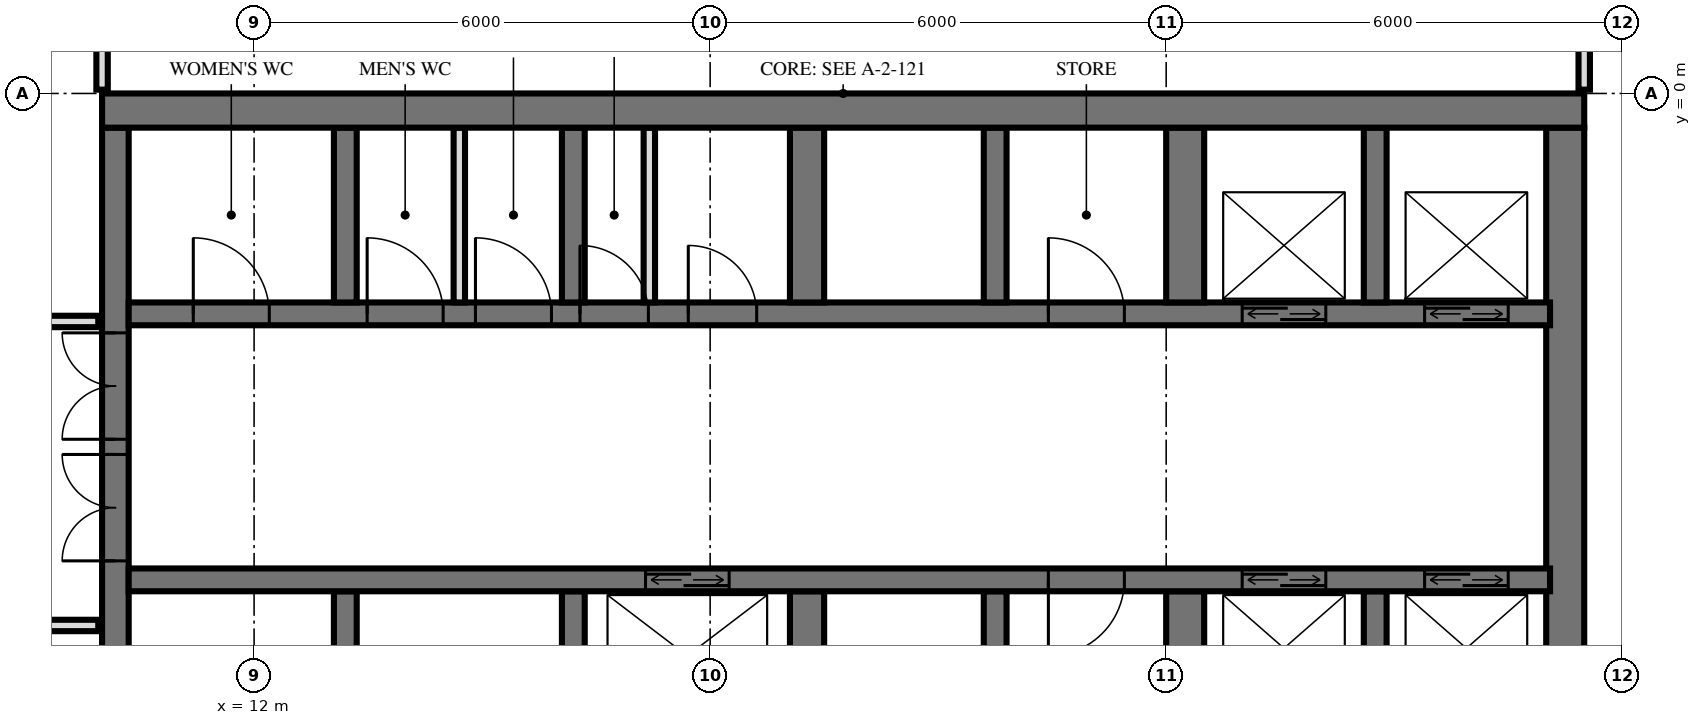
"""IFC4 building model, lengths in metres.
Left out: names, types, materials, properties, quantities, classifications, styles, units other than length and angle.
Written with IfcOpenShell. Run it as: python <this file> out.ifc"""

import sys

from ifc_helpers import new_model, si_unit, direction, frame, frame_2d, origin, place, context, subcontext, project, spatial, rectangle, extrude, element, fill, save


model = new_model("IFC4")
c1 = context("Model", 3, precision=1e-05, world=origin(), true_north=direction((0.0, 1.0)))
c2 = subcontext(c1, "Body", "Model", "MODEL_VIEW")
j1 = project(units=[si_unit("LENGTHUNIT", "METRE"), si_unit("PLANEANGLEUNIT", "RADIAN")], contexts=[c1])
p1 = place(None, origin())
s1 = spatial("IfcSite", under=j1, at=p1, CompositionType="ELEMENT")
p2 = place(p1, origin())
s2 = spatial("IfcBuilding", under=s1, at=p2, CompositionType="ELEMENT")
p3 = place(p2, frame((0.0, 0.0, 31.2)))
s3 = spatial("IfcBuildingStorey", under=s2, at=p3, CompositionType="ELEMENT", Elevation=31.2)
p4 = place(p3, frame((10.0, -0.225, 0.0), z_axis=(0.0, 0.0, 1.0), x_axis=(1.0, 0.0, 0.0)))
e1 = element("IfcWall", 1, at=p4, inside=s3, PredefinedType="SHEAR", context=c2, shape_type="SweptSolid", body=[
    extrude(rectangle(XDim=19.5, YDim=0.45, at=frame_2d((9.75, 0.0))), origin(), (0.0, 0.0, 1.0), 3.6),
])
p5 = place(p3, frame((10.175, -14.55, 0.0), z_axis=(0.0, 0.0, 1.0), x_axis=(0.0, 1.0, 0.0)))
e2 = element("IfcWall", 2, at=p5, inside=s3, PredefinedType="SHEAR", context=c2, shape_type="SweptSolid", body=[
    extrude(rectangle(XDim=14.1, YDim=0.35, at=frame_2d((7.05, 0.0))), origin(), (0.0, 0.0, 1.0), 3.6),
])
p6 = place(p5, frame((8.4, 0.0, 0.0)))
e3 = element("IfcOpeningElement", 3, at=p6, cuts=e2, PredefinedType="OPENING", context=c2, shape_type="SweptSolid", body=[
    extrude(rectangle(XDim=1.4, YDim=2.4, at=frame_2d((0.7, 1.2))), frame((0.0, 0.185, 0.0), z_axis=(0.0, -1.0, 0.0), x_axis=(1.0, 0.0, 0.0)), (0.0, 0.0, 1.0), 0.37),
])
p7 = place(p5, frame((10.0, 0.0, 0.0)))
e4 = element("IfcOpeningElement", 4, at=p7, cuts=e2, PredefinedType="OPENING", context=c2, shape_type="SweptSolid", body=[
    extrude(rectangle(XDim=1.4, YDim=2.4, at=frame_2d((0.7, 1.2))), frame((0.0, 0.185, 0.0), z_axis=(0.0, -1.0, 0.0), x_axis=(1.0, 0.0, 0.0)), (0.0, 0.0, 1.0), 0.37),
])
p8 = place(p5, frame((4.0, 0.0, 0.0)))
e5 = element("IfcOpeningElement", 5, at=p8, cuts=e2, PredefinedType="OPENING", context=c2, shape_type="SweptSolid", body=[
    extrude(rectangle(XDim=1.2, YDim=2.1, at=frame_2d((0.6, 1.05))), frame((0.0, 0.185, 0.0), z_axis=(0.0, -1.0, 0.0), x_axis=(1.0, 0.0, 0.0)), (0.0, 0.0, 1.0), 0.37),
])
p9 = place(p3, frame((29.25, -14.55, 0.0), z_axis=(0.0, 0.0, 1.0), x_axis=(0.0, 1.0, 0.0)))
e6 = element("IfcWall", 6, at=p9, inside=s3, PredefinedType="SHEAR", context=c2, shape_type="SweptSolid", body=[
    extrude(rectangle(XDim=14.1, YDim=0.5, at=frame_2d((7.05, 0.0))), origin(), (0.0, 0.0, 1.0), 3.6),
])
p10 = place(p3, frame((10.35, -2.9, 0.0), z_axis=(0.0, 0.0, 1.0), x_axis=(1.0, 0.0, 0.0)))
e7 = element("IfcWall", 7, at=p10, inside=s3, PredefinedType="SHEAR", context=c2, shape_type="SweptSolid", body=[
    extrude(rectangle(XDim=18.7, YDim=0.3, at=frame_2d((9.35, 0.0))), origin(), (0.0, 0.0, 1.0), 3.6),
])
p11 = place(p10, frame((14.65, 0.0, 0.0)))
e8 = element("IfcOpeningElement", 8, at=p11, cuts=e7, PredefinedType="OPENING", context=c2, shape_type="SweptSolid", body=[
    extrude(rectangle(XDim=1.1, YDim=2.1, at=frame_2d((0.55, 1.05))), frame((0.0, 0.16, 0.0), z_axis=(0.0, -1.0, 0.0), x_axis=(1.0, 0.0, 0.0)), (0.0, 0.0, 1.0), 0.32),
])
p12 = place(p10, frame((17.05, 0.0, 0.0)))
e9 = element("IfcOpeningElement", 9, at=p12, cuts=e7, PredefinedType="OPENING", context=c2, shape_type="SweptSolid", body=[
    extrude(rectangle(XDim=1.1, YDim=2.1, at=frame_2d((0.55, 1.05))), frame((0.0, 0.16, 0.0), z_axis=(0.0, -1.0, 0.0), x_axis=(1.0, 0.0, 0.0)), (0.0, 0.0, 1.0), 0.32),
])
p13 = place(p10, frame((5.938, 0.0, 0.0)))
e10 = element("IfcOpeningElement", 10, at=p13, cuts=e7, PredefinedType="OPENING", context=c2, shape_type="SweptSolid", body=[
    extrude(rectangle(XDim=0.9, YDim=2.1, at=frame_2d((0.45, 1.05))), frame((0.0, 0.16, 0.0), z_axis=(0.0, -1.0, 0.0), x_axis=(1.0, 0.0, 0.0)), (0.0, 0.0, 1.0), 0.32),
])
p14 = place(p10, frame((7.363, 0.0, 0.0)))
e11 = element("IfcOpeningElement", 11, at=p14, cuts=e7, PredefinedType="OPENING", context=c2, shape_type="SweptSolid", body=[
    extrude(rectangle(XDim=0.9, YDim=2.1, at=frame_2d((0.45, 1.05))), frame((0.0, 0.16, 0.0), z_axis=(0.0, -1.0, 0.0), x_axis=(1.0, 0.0, 0.0)), (0.0, 0.0, 1.0), 0.32),
])
p15 = place(p10, frame((0.85, 0.0, 0.0)))
e12 = element("IfcOpeningElement", 12, at=p15, cuts=e7, PredefinedType="OPENING", context=c2, shape_type="SweptSolid", body=[
    extrude(rectangle(XDim=1.0, YDim=2.1, at=frame_2d((0.5, 1.05))), frame((0.0, 0.16, 0.0), z_axis=(0.0, -1.0, 0.0), x_axis=(1.0, 0.0, 0.0)), (0.0, 0.0, 1.0), 0.32),
])
p16 = place(p10, frame((3.137, 0.0, 0.0)))
e13 = element("IfcOpeningElement", 13, at=p16, cuts=e7, PredefinedType="OPENING", context=c2, shape_type="SweptSolid", body=[
    extrude(rectangle(XDim=1.0, YDim=2.1, at=frame_2d((0.5, 1.05))), frame((0.0, 0.16, 0.0), z_axis=(0.0, -1.0, 0.0), x_axis=(1.0, 0.0, 0.0)), (0.0, 0.0, 1.0), 0.32),
])
p17 = place(p10, frame((4.562, 0.0, 0.0)))
e14 = element("IfcOpeningElement", 14, at=p17, cuts=e7, PredefinedType="OPENING", context=c2, shape_type="SweptSolid", body=[
    extrude(rectangle(XDim=1.0, YDim=2.1, at=frame_2d((0.5, 1.05))), frame((0.0, 0.16, 0.0), z_axis=(0.0, -1.0, 0.0), x_axis=(1.0, 0.0, 0.0)), (0.0, 0.0, 1.0), 0.32),
])
p18 = place(p10, frame((12.1, 0.0, 0.0)))
e15 = element("IfcOpeningElement", 15, at=p18, cuts=e7, PredefinedType="OPENING", context=c2, shape_type="SweptSolid", body=[
    extrude(rectangle(XDim=1.0, YDim=2.1, at=frame_2d((0.5, 1.05))), frame((0.0, 0.16, 0.0), z_axis=(0.0, -1.0, 0.0), x_axis=(1.0, 0.0, 0.0)), (0.0, 0.0, 1.0), 0.32),
])
p19 = place(p3, frame((10.35, -6.4, 0.0), z_axis=(0.0, 0.0, 1.0), x_axis=(1.0, 0.0, 0.0)))
e16 = element("IfcWall", 16, at=p19, inside=s3, PredefinedType="SHEAR", context=c2, shape_type="SweptSolid", body=[
    extrude(rectangle(XDim=18.7, YDim=0.3, at=frame_2d((9.35, 0.0))), origin(), (0.0, 0.0, 1.0), 3.6),
])
p20 = place(p19, frame((14.65, 0.0, 0.0)))
e17 = element("IfcOpeningElement", 17, at=p20, cuts=e16, PredefinedType="OPENING", context=c2, shape_type="SweptSolid", body=[
    extrude(rectangle(XDim=1.1, YDim=2.1, at=frame_2d((0.55, 1.05))), frame((0.0, 0.16, 0.0), z_axis=(0.0, -1.0, 0.0), x_axis=(1.0, 0.0, 0.0)), (0.0, 0.0, 1.0), 0.32),
])
p21 = place(p19, frame((17.05, 0.0, 0.0)))
e18 = element("IfcOpeningElement", 18, at=p21, cuts=e16, PredefinedType="OPENING", context=c2, shape_type="SweptSolid", body=[
    extrude(rectangle(XDim=1.1, YDim=2.1, at=frame_2d((0.55, 1.05))), frame((0.0, 0.16, 0.0), z_axis=(0.0, -1.0, 0.0), x_axis=(1.0, 0.0, 0.0)), (0.0, 0.0, 1.0), 0.32),
])
p22 = place(p19, frame((6.8, 0.0, 0.0)))
e19 = element("IfcOpeningElement", 19, at=p22, cuts=e16, PredefinedType="OPENING", context=c2, shape_type="SweptSolid", body=[
    extrude(rectangle(XDim=1.1, YDim=2.1, at=frame_2d((0.55, 1.05))), frame((0.0, 0.16, 0.0), z_axis=(0.0, -1.0, 0.0), x_axis=(1.0, 0.0, 0.0)), (0.0, 0.0, 1.0), 0.32),
])
p23 = place(p19, frame((12.1, 0.0, 0.0)))
e20 = element("IfcOpeningElement", 20, at=p23, cuts=e16, PredefinedType="OPENING", context=c2, shape_type="SweptSolid", body=[
    extrude(rectangle(XDim=1.0, YDim=2.1, at=frame_2d((0.5, 1.05))), frame((0.0, 0.16, 0.0), z_axis=(0.0, -1.0, 0.0), x_axis=(1.0, 0.0, 0.0)), (0.0, 0.0, 1.0), 0.32),
])
for number, where, z_axis, x_axis in (
    (21, (13.2, -2.75, 0.0), (0.0, 0.0, 1.0), (0.0, 1.0, 0.0)),
    (22, (13.2, -8.85, 0.0), (0.0, 0.0, 1.0), (0.0, 1.0, 0.0)),
    (23, (16.2, -2.75, 0.0), (0.0, 0.0, 1.0), (0.0, 1.0, 0.0)),
    (24, (16.2, -8.85, 0.0), (0.0, 0.0, 1.0), (0.0, 1.0, 0.0)),
):
    element("IfcWall", number, at=place(p3, frame(where, z_axis=z_axis, x_axis=x_axis)), inside=s3, PredefinedType="SHEAR", context=c2, shape_type="SweptSolid", body=[
        extrude(rectangle(XDim=2.3, YDim=0.3, at=frame_2d((1.15, 0.0))), origin(), (0.0, 0.0, 1.0), 3.6),
    ])
for number, where, z_axis, x_axis in (
    (25, (19.275, -2.75, 0.0), (0.0, 0.0, 1.0), (0.0, 1.0, 0.0)),
    (26, (19.275, -8.85, 0.0), (0.0, 0.0, 1.0), (0.0, 1.0, 0.0)),
):
    element("IfcWall", number, at=place(p3, frame(where, z_axis=z_axis, x_axis=x_axis)), inside=s3, PredefinedType="SHEAR", context=c2, shape_type="SweptSolid", body=[
        extrude(rectangle(XDim=2.3, YDim=0.45, at=frame_2d((1.15, 0.0))), origin(), (0.0, 0.0, 1.0), 3.6),
    ])
for number, where, z_axis, x_axis in (
    (27, (21.75, -2.75, 0.0), (0.0, 0.0, 1.0), (0.0, 1.0, 0.0)),
    (28, (21.75, -8.85, 0.0), (0.0, 0.0, 1.0), (0.0, 1.0, 0.0)),
):
    element("IfcWall", number, at=place(p3, frame(where, z_axis=z_axis, x_axis=x_axis)), inside=s3, PredefinedType="SHEAR", context=c2, shape_type="SweptSolid", body=[
        extrude(rectangle(XDim=2.3, YDim=0.3, at=frame_2d((1.15, 0.0))), origin(), (0.0, 0.0, 1.0), 3.6),
    ])
for number, where, z_axis, x_axis in (
    (29, (24.25, -2.75, 0.0), (0.0, 0.0, 1.0), (0.0, 1.0, 0.0)),
    (30, (24.25, -8.85, 0.0), (0.0, 0.0, 1.0), (0.0, 1.0, 0.0)),
):
    element("IfcWall", number, at=place(p3, frame(where, z_axis=z_axis, x_axis=x_axis)), inside=s3, PredefinedType="SHEAR", context=c2, shape_type="SweptSolid", body=[
        extrude(rectangle(XDim=2.3, YDim=0.5, at=frame_2d((1.15, 0.0))), origin(), (0.0, 0.0, 1.0), 3.6),
    ])
for number, where, z_axis, x_axis in (
    (31, (26.75, -2.75, 0.0), (0.0, 0.0, 1.0), (0.0, 1.0, 0.0)),
    (32, (26.75, -8.85, 0.0), (0.0, 0.0, 1.0), (0.0, 1.0, 0.0)),
):
    element("IfcWall", number, at=place(p3, frame(where, z_axis=z_axis, x_axis=x_axis)), inside=s3, PredefinedType="SHEAR", context=c2, shape_type="SweptSolid", body=[
        extrude(rectangle(XDim=2.3, YDim=0.3, at=frame_2d((1.15, 0.0))), origin(), (0.0, 0.0, 1.0), 3.6),
    ])
for number, where, z_axis, x_axis in (
    (33, (17.2, -2.75, 0.0), (0.0, 0.0, 1.0), (0.0, 1.0, 0.0)),
    (34, (14.7, -2.75, 0.0), (0.0, 0.0, 1.0), (0.0, 1.0, 0.0)),
):
    element("IfcWall", number, at=place(p3, frame(where, z_axis=z_axis, x_axis=x_axis)), inside=s3, PredefinedType="PARTITIONING", context=c2, shape_type="SweptSolid", body=[
        extrude(rectangle(XDim=2.3, YDim=0.15, at=frame_2d((1.15, 0.0))), origin(), (0.0, 0.0, 1.0), 3.3),
    ])
p24 = place(p3, frame((29.5, 0.05, 0.0), z_axis=(0.0, 0.0, 1.0), x_axis=(0.0, 1.0, 0.0)))
e35 = element("IfcWall", 35, at=p24, inside=s3, PredefinedType="PARTITIONING", context=c2, shape_type="SweptSolid", body=[
    extrude(rectangle(XDim=0.827, YDim=0.15, at=frame_2d((0.414, 0.0))), origin(), (0.0, 0.0, 1.0), 3.32),
])
p25 = place(p3, frame((10.0, 0.05, 0.0), z_axis=(0.0, 0.0, 1.0), x_axis=(0.0, 1.0, 0.0)))
e36 = element("IfcWall", 36, at=p25, inside=s3, PredefinedType="PARTITIONING", context=c2, shape_type="SweptSolid", body=[
    extrude(rectangle(XDim=0.97, YDim=0.15, at=frame_2d((0.485, 0.0))), origin(), (0.0, 0.0, 1.0), 3.32),
])
p26 = place(p3, frame((-9.95, -7.0, 0.0), z_axis=(0.0, 0.0, 1.0), x_axis=(1.0, 0.0, 0.0)))
e37 = element("IfcWall", 37, at=p26, inside=s3, PredefinedType="PARTITIONING", context=c2, shape_type="SweptSolid", body=[
    extrude(rectangle(XDim=19.9, YDim=0.15, at=frame_2d((9.95, 0.0))), origin(), (0.0, 0.0, 1.0), 3.32),
])
p27 = place(p26, frame((9.45, 0.0, 0.0)))
e38 = element("IfcOpeningElement", 38, at=p27, cuts=e37, PredefinedType="OPENING", context=c2, shape_type="SweptSolid", body=[
    extrude(rectangle(XDim=1.0, YDim=2.1, at=frame_2d((0.5, 1.05))), frame((0.0, 0.085, 0.0), z_axis=(0.0, -1.0, 0.0), x_axis=(1.0, 0.0, 0.0)), (0.0, 0.0, 1.0), 0.17),
])
p28 = place(p26, frame((3.45, 0.0, 0.0)))
e39 = element("IfcOpeningElement", 39, at=p28, cuts=e37, PredefinedType="OPENING", context=c2, shape_type="SweptSolid", body=[
    extrude(rectangle(XDim=1.0, YDim=2.1, at=frame_2d((0.5, 1.05))), frame((0.0, 0.085, 0.0), z_axis=(0.0, -1.0, 0.0), x_axis=(1.0, 0.0, 0.0)), (0.0, 0.0, 1.0), 0.17),
])
p29 = place(p3, frame((-9.95, -3.0, 0.0), z_axis=(0.0, 0.0, 1.0), x_axis=(1.0, 0.0, 0.0)))
e40 = element("IfcWall", 40, at=p29, inside=s3, PredefinedType="PARTITIONING", context=c2, shape_type="SweptSolid", body=[
    extrude(rectangle(XDim=19.9, YDim=0.15, at=frame_2d((9.95, 0.0))), origin(), (0.0, 0.0, 1.0), 3.32),
])
p30 = place(p29, frame((0.95, 0.0, 0.0)))
e41 = element("IfcOpeningElement", 41, at=p30, cuts=e40, PredefinedType="OPENING", context=c2, shape_type="SweptSolid", body=[
    extrude(rectangle(XDim=1.0, YDim=2.1, at=frame_2d((0.5, 1.05))), frame((0.0, 0.085, 0.0), z_axis=(0.0, -1.0, 0.0), x_axis=(1.0, 0.0, 0.0)), (0.0, 0.0, 1.0), 0.17),
])
p31 = place(p29, frame((3.7, 0.0, 0.0)))
e42 = element("IfcOpeningElement", 42, at=p31, cuts=e40, PredefinedType="OPENING", context=c2, shape_type="SweptSolid", body=[
    extrude(rectangle(XDim=1.0, YDim=2.1, at=frame_2d((0.5, 1.05))), frame((0.0, 0.085, 0.0), z_axis=(0.0, -1.0, 0.0), x_axis=(1.0, 0.0, 0.0)), (0.0, 0.0, 1.0), 0.17),
])
p32 = place(p29, frame((8.45, 0.0, 0.0)))
e43 = element("IfcOpeningElement", 43, at=p32, cuts=e40, PredefinedType="OPENING", context=c2, shape_type="SweptSolid", body=[
    extrude(rectangle(XDim=1.0, YDim=2.1, at=frame_2d((0.5, 1.05))), frame((0.0, 0.085, 0.0), z_axis=(0.0, -1.0, 0.0), x_axis=(1.0, 0.0, 0.0)), (0.0, 0.0, 1.0), 0.17),
])
p33 = place(p29, frame((15.7, 0.0, 0.0)))
e44 = element("IfcOpeningElement", 44, at=p33, cuts=e40, PredefinedType="OPENING", context=c2, shape_type="SweptSolid", body=[
    extrude(rectangle(XDim=1.0, YDim=2.1, at=frame_2d((0.5, 1.05))), frame((0.0, 0.085, 0.0), z_axis=(0.0, -1.0, 0.0), x_axis=(1.0, 0.0, 0.0)), (0.0, 0.0, 1.0), 0.17),
])
p34 = place(p11, origin())
e45 = element("IfcDoor", 45, at=p34, inside=s3, OperationType="DOUBLE_DOOR_SLIDING", PredefinedType="USERDEFINED", context=c2, shape_type="SweptSolid", body=[
    extrude(rectangle(XDim=1.1, YDim=2.1, at=frame_2d((0.55, 1.05))), frame((0.0, 0.025, 0.0), z_axis=(0.0, -1.0, 0.0), x_axis=(1.0, 0.0, 0.0)), (0.0, 0.0, 1.0), 0.05),
])
fill(e8, e45)
p35 = place(p12, origin())
e46 = element("IfcDoor", 46, at=p35, inside=s3, OperationType="DOUBLE_DOOR_SLIDING", PredefinedType="USERDEFINED", context=c2, shape_type="SweptSolid", body=[
    extrude(rectangle(XDim=1.1, YDim=2.1, at=frame_2d((0.55, 1.05))), frame((0.0, 0.025, 0.0), z_axis=(0.0, -1.0, 0.0), x_axis=(1.0, 0.0, 0.0)), (0.0, 0.0, 1.0), 0.05),
])
fill(e9, e46)
p36 = place(p20, origin())
e47 = element("IfcDoor", 47, at=p36, inside=s3, OperationType="DOUBLE_DOOR_SLIDING", PredefinedType="USERDEFINED", context=c2, shape_type="SweptSolid", body=[
    extrude(rectangle(XDim=1.1, YDim=2.1, at=frame_2d((0.55, 1.05))), frame((0.0, 0.025, 0.0), z_axis=(0.0, -1.0, 0.0), x_axis=(1.0, 0.0, 0.0)), (0.0, 0.0, 1.0), 0.05),
])
fill(e17, e47)
p37 = place(p21, origin())
e48 = element("IfcDoor", 48, at=p37, inside=s3, OperationType="DOUBLE_DOOR_SLIDING", PredefinedType="USERDEFINED", context=c2, shape_type="SweptSolid", body=[
    extrude(rectangle(XDim=1.1, YDim=2.1, at=frame_2d((0.55, 1.05))), frame((0.0, 0.025, 0.0), z_axis=(0.0, -1.0, 0.0), x_axis=(1.0, 0.0, 0.0)), (0.0, 0.0, 1.0), 0.05),
])
fill(e18, e48)
p38 = place(p22, origin())
e49 = element("IfcDoor", 49, at=p38, inside=s3, OperationType="DOUBLE_DOOR_SLIDING", PredefinedType="USERDEFINED", context=c2, shape_type="SweptSolid", body=[
    extrude(rectangle(XDim=1.1, YDim=2.1, at=frame_2d((0.55, 1.05))), frame((0.0, 0.025, 0.0), z_axis=(0.0, -1.0, 0.0), x_axis=(1.0, 0.0, 0.0)), (0.0, 0.0, 1.0), 0.05),
])
fill(e19, e49)
p39 = place(p6, origin())
e50 = element("IfcDoor", 50, at=p39, inside=s3, OperationType="DOUBLE_DOOR_SINGLE_SWING", PredefinedType="DOOR", context=c2, shape_type="SweptSolid", body=[
    extrude(rectangle(XDim=1.4, YDim=2.4, at=frame_2d((0.7, 1.2))), frame((0.0, 0.025, 0.0), z_axis=(0.0, -1.0, 0.0), x_axis=(1.0, 0.0, 0.0)), (0.0, 0.0, 1.0), 0.05),
])
fill(e3, e50)
p40 = place(p7, origin())
e51 = element("IfcDoor", 51, at=p40, inside=s3, OperationType="DOUBLE_DOOR_SINGLE_SWING", PredefinedType="DOOR", context=c2, shape_type="SweptSolid", body=[
    extrude(rectangle(XDim=1.4, YDim=2.4, at=frame_2d((0.7, 1.2))), frame((0.0, 0.025, 0.0), z_axis=(0.0, -1.0, 0.0), x_axis=(1.0, 0.0, 0.0)), (0.0, 0.0, 1.0), 0.05),
])
fill(e4, e51)
p41 = place(p13, origin())
e52 = element("IfcDoor", 52, at=p41, inside=s3, OperationType="SINGLE_SWING_RIGHT", PredefinedType="DOOR", context=c2, shape_type="SweptSolid", body=[
    extrude(rectangle(XDim=0.9, YDim=2.1, at=frame_2d((0.45, 1.05))), frame((0.0, 0.025, 0.0), z_axis=(0.0, -1.0, 0.0), x_axis=(1.0, 0.0, 0.0)), (0.0, 0.0, 1.0), 0.05),
])
fill(e10, e52)
p42 = place(p14, origin())
e53 = element("IfcDoor", 53, at=p42, inside=s3, OperationType="SINGLE_SWING_RIGHT", PredefinedType="DOOR", context=c2, shape_type="SweptSolid", body=[
    extrude(rectangle(XDim=0.9, YDim=2.1, at=frame_2d((0.45, 1.05))), frame((0.0, 0.025, 0.0), z_axis=(0.0, -1.0, 0.0), x_axis=(1.0, 0.0, 0.0)), (0.0, 0.0, 1.0), 0.05),
])
fill(e11, e53)
p43 = place(p15, origin())
e54 = element("IfcDoor", 54, at=p43, inside=s3, OperationType="SINGLE_SWING_RIGHT", PredefinedType="DOOR", context=c2, shape_type="SweptSolid", body=[
    extrude(rectangle(XDim=1.0, YDim=2.1, at=frame_2d((0.5, 1.05))), frame((0.0, 0.025, 0.0), z_axis=(0.0, -1.0, 0.0), x_axis=(1.0, 0.0, 0.0)), (0.0, 0.0, 1.0), 0.05),
])
fill(e12, e54)
p44 = place(p16, origin())
e55 = element("IfcDoor", 55, at=p44, inside=s3, OperationType="SINGLE_SWING_RIGHT", PredefinedType="DOOR", context=c2, shape_type="SweptSolid", body=[
    extrude(rectangle(XDim=1.0, YDim=2.1, at=frame_2d((0.5, 1.05))), frame((0.0, 0.025, 0.0), z_axis=(0.0, -1.0, 0.0), x_axis=(1.0, 0.0, 0.0)), (0.0, 0.0, 1.0), 0.05),
])
fill(e13, e55)
p45 = place(p17, origin())
e56 = element("IfcDoor", 56, at=p45, inside=s3, OperationType="SINGLE_SWING_RIGHT", PredefinedType="DOOR", context=c2, shape_type="SweptSolid", body=[
    extrude(rectangle(XDim=1.0, YDim=2.1, at=frame_2d((0.5, 1.05))), frame((0.0, 0.025, 0.0), z_axis=(0.0, -1.0, 0.0), x_axis=(1.0, 0.0, 0.0)), (0.0, 0.0, 1.0), 0.05),
])
fill(e14, e56)
p46 = place(p18, origin())
e57 = element("IfcDoor", 57, at=p46, inside=s3, OperationType="SINGLE_SWING_RIGHT", PredefinedType="DOOR", context=c2, shape_type="SweptSolid", body=[
    extrude(rectangle(XDim=1.0, YDim=2.1, at=frame_2d((0.5, 1.05))), frame((0.0, 0.025, 0.0), z_axis=(0.0, -1.0, 0.0), x_axis=(1.0, 0.0, 0.0)), (0.0, 0.0, 1.0), 0.05),
])
fill(e15, e57)
p47 = place(p23, frame((0.5, 0.0, 0.0), z_axis=(0.0, 0.0, 1.0), x_axis=(-1.0, 0.0, 0.0)))
e58 = element("IfcDoor", 58, at=p47, inside=s3, OperationType="SINGLE_SWING_LEFT", PredefinedType="DOOR", context=c2, shape_type="SweptSolid", body=[
    extrude(rectangle(XDim=1.0, YDim=2.1, at=frame_2d((0.0, 1.05))), frame((0.0, -0.025, 0.0), z_axis=(0.0, 1.0, 0.0), x_axis=(-1.0, 0.0, 0.0)), (0.0, 0.0, 1.0), 0.05),
])
fill(e20, e58)
save(model, sys.argv[1])
